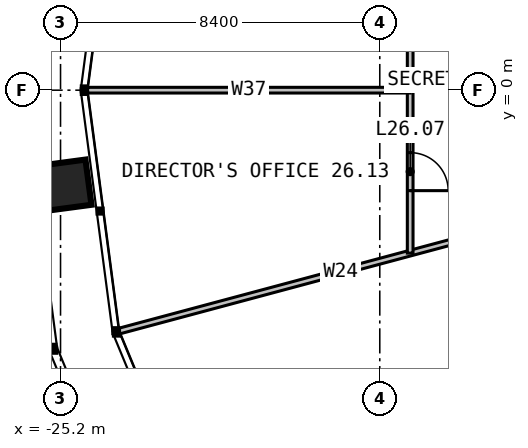
"""IFC4 building model, lengths in metres.
Left out: names, types, materials, properties, quantities, classifications, styles, units other than length and angle.
Written with IfcOpenShell. Run it as: python <this file> out.ifc"""

import sys

from ifc_helpers import new_model, si_unit, direction, frame, frame_2d, origin, place, context, subcontext, project, spatial, rectangle, extrude, element, fill, save


model = new_model("IFC4")
c1 = context("Model", 3, precision=1e-05, world=origin(), true_north=direction((0.0, 1.0)))
c2 = subcontext(c1, "Body", "Model", "MODEL_VIEW")
j1 = project(units=[si_unit("LENGTHUNIT", "METRE"), si_unit("PLANEANGLEUNIT", "RADIAN")], contexts=[c1])
p1 = place(None, origin())
s1 = spatial("IfcSite", under=j1, at=p1, CompositionType="ELEMENT")
p2 = place(p1, origin())
s2 = spatial("IfcBuilding", under=s1, at=p2, CompositionType="ELEMENT")
p3 = place(p2, frame((0.0, 0.0, 110.0)))
s3 = spatial("IfcBuildingStorey", under=s2, at=p3, CompositionType="ELEMENT", Elevation=110.0)
p4 = place(p3, frame((-12.0, -3.215, 0.0), z_axis=(0.0, 0.0, 1.0), x_axis=(-0.965926913807, -0.258814986396, 0.0)))
e1 = element("IfcWall", 1, at=p4, inside=s3, PredefinedType="PARTITIONING", context=c2, shape_type="SweptSolid", body=[
    extrude(rectangle(XDim=12.064, YDim=0.15, at=frame_2d((6.032, 0.0))), origin(), (0.0, 0.0, 1.0), 2.79),
])
p5 = place(p3, frame((-12.0, -6.928, 0.0), z_axis=(0.0, 0.0, 1.0), x_axis=(-0.866024197053, -0.500002090115, 0.0)))
e2 = element("IfcWall", 2, at=p5, inside=s3, PredefinedType="PARTITIONING", context=c2, shape_type="SweptSolid", body=[
    extrude(rectangle(XDim=10.631, YDim=0.15, at=frame_2d((5.315, 0.0))), origin(), (0.0, 0.0, 1.0), 2.79),
])
p6 = place(p3, frame((-16.0, 9.238, 0.0), z_axis=(0.0, 0.0, 1.0), x_axis=(0.0, -1.0, 0.0)))
e3 = element("IfcWall", 3, at=p6, inside=s3, PredefinedType="PARTITIONING", context=c2, shape_type="SweptSolid", body=[
    extrude(rectangle(XDim=13.525, YDim=0.15, at=frame_2d((6.762, 0.0))), origin(), (0.0, 0.0, 1.0), 2.79),
])
p7 = place(p6, frame((1.975, 0.0, 0.0)))
e4 = element("IfcOpeningElement", 4, at=p7, cuts=e3, PredefinedType="OPENING", context=c2, shape_type="SweptSolid", body=[
    extrude(rectangle(XDim=1.0, YDim=2.2, at=frame_2d((0.5, 1.1))), frame((0.0, 0.085, 0.0), z_axis=(0.0, -1.0, 0.0), x_axis=(1.0, 0.0, 0.0)), (0.0, 0.0, 1.0), 0.17),
])
p8 = place(p6, frame((6.594, 0.0, 0.0)))
e5 = element("IfcOpeningElement", 5, at=p8, cuts=e3, PredefinedType="OPENING", context=c2, shape_type="SweptSolid", body=[
    extrude(rectangle(XDim=1.0, YDim=2.2, at=frame_2d((0.5, 1.1))), frame((0.0, 0.085, 0.0), z_axis=(0.0, -1.0, 0.0), x_axis=(1.0, 0.0, 0.0)), (0.0, 0.0, 1.0), 0.17),
])
p9 = place(p6, frame((10.881, 0.0, 0.0)))
e6 = element("IfcOpeningElement", 6, at=p9, cuts=e3, PredefinedType="OPENING", context=c2, shape_type="SweptSolid", body=[
    extrude(rectangle(XDim=1.0, YDim=2.2, at=frame_2d((0.5, 1.1))), frame((0.0, 0.085, 0.0), z_axis=(0.0, -1.0, 0.0), x_axis=(1.0, 0.0, 0.0)), (0.0, 0.0, 1.0), 0.17),
])
p10 = place(p3, frame((-16.0, 0.0, 0.0), z_axis=(0.0, 0.0, 1.0), x_axis=(-1.0, 0.0, 0.0)))
e7 = element("IfcWall", 7, at=p10, inside=s3, PredefinedType="PARTITIONING", context=c2, shape_type="SweptSolid", body=[
    extrude(rectangle(XDim=8.487, YDim=0.15, at=frame_2d((4.244, 0.0))), origin(), (0.0, 0.0, 1.0), 2.79),
])
p11 = place(p9, origin())
e8 = element("IfcDoor", 8, at=p11, inside=s3, OperationType="SINGLE_SWING_RIGHT", PredefinedType="DOOR", context=c2, shape_type="SweptSolid", body=[
    extrude(rectangle(XDim=1.0, YDim=2.2, at=frame_2d((0.5, 1.1))), frame((0.0, 0.025, 0.0), z_axis=(0.0, -1.0, 0.0), x_axis=(1.0, 0.0, 0.0)), (0.0, 0.0, 1.0), 0.05),
])
fill(e6, e8)
save(model, sys.argv[1])
